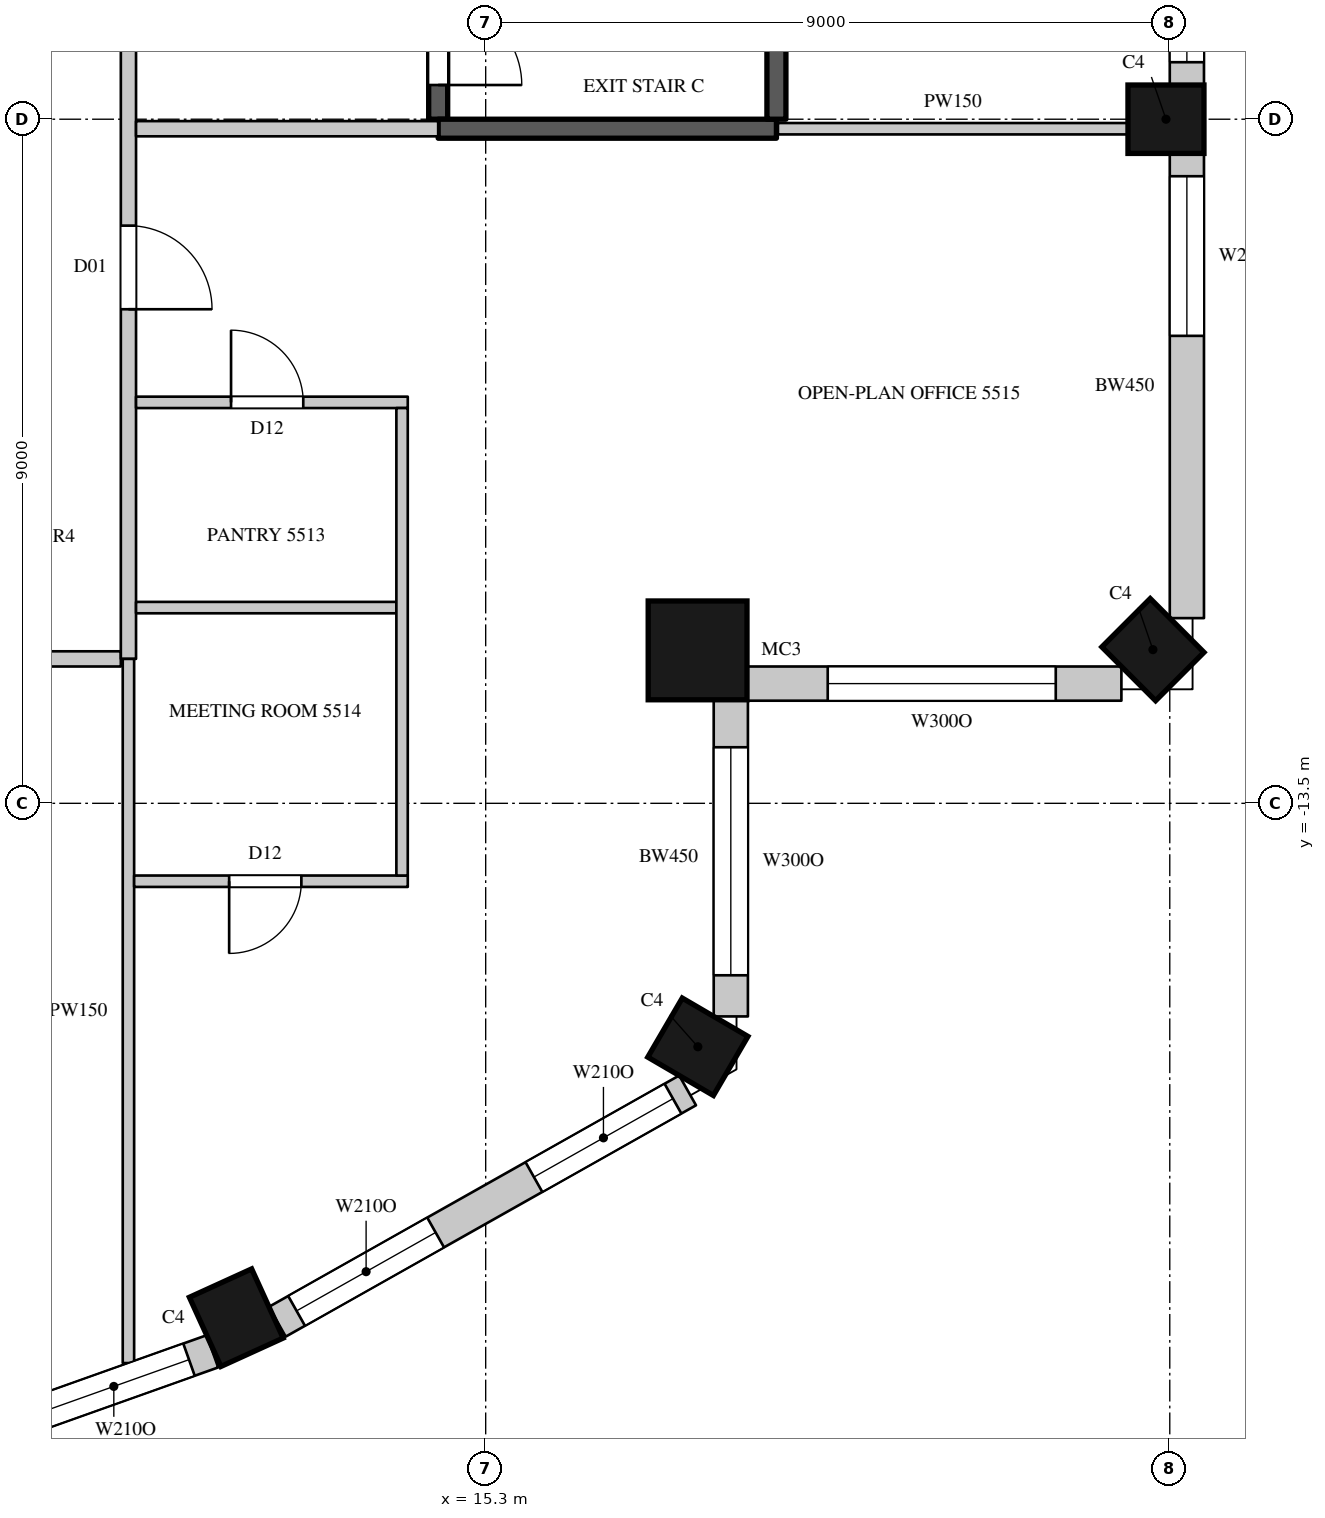
"""IFC4 building model, lengths in metres.
Left out: names, types, materials, properties, quantities, classifications, styles, units other than length and angle.
Written with IfcOpenShell. Run it as: python <this file> out.ifc"""

import sys

from ifc_helpers import new_model, si_unit, direction, frame, frame_2d, origin, origin_2d, place, context, subcontext, project, spatial, rectangle, circle, extrude, element, fill, save


model = new_model("IFC4")
c1 = context("Model", 3, precision=1e-05, world=origin(), true_north=direction((0.0, 1.0)))
c2 = subcontext(c1, "Body", "Model", "MODEL_VIEW")
j1 = project(units=[si_unit("LENGTHUNIT", "METRE"), si_unit("PLANEANGLEUNIT", "RADIAN")], contexts=[c1])
p1 = place(None, origin())
s1 = spatial("IfcSite", under=j1, at=p1, CompositionType="ELEMENT")
p2 = place(p1, origin())
s2 = spatial("IfcBuilding", under=s1, at=p2, CompositionType="ELEMENT")
p3 = place(p2, frame((0.0, 0.0, 247.5)))
s3 = spatial("IfcBuildingStorey", under=s2, at=p3, CompositionType="ELEMENT", Elevation=247.5)
for number, where, z_axis, x_axis in (
    (1, (12.019, -20.267, 0.0), (0.0, 0.0, 1.0), (0.91, 0.415, 0.0)),
    (2, (18.091, -16.703, 0.0), (0.0, 0.0, 1.0), (0.504, 0.863, 0.0)),
):
    element("IfcColumn", number, at=place(p3, frame(where, z_axis=z_axis, x_axis=x_axis)), inside=s3, PredefinedType="COLUMN", context=c2, shape_type="SweptSolid", body=[
        extrude(rectangle(XDim=0.9, YDim=1.0, at=origin_2d()), origin(), (0.0, 0.0, 1.0), 4.1),
    ])
p4 = place(p3, frame((18.088, -11.488, 0.0), z_axis=(0.0, 0.0, 1.0), x_axis=(1.0, 0.0, 0.0)))
e3 = element("IfcColumn", 3, at=p4, inside=s3, PredefinedType="COLUMN", context=c2, shape_type="SweptSolid", body=[
    extrude(circle(Radius=0.65, at=origin_2d()), origin(), (0.0, 0.0, 1.0), 4.1),
])
for number, where, z_axis, x_axis in (
    (4, (24.078, -11.478, 0.0), (0.0, 0.0, 1.0), (0.707, 0.707, 0.0)),
    (5, (24.25, -4.5, 0.0), (0.0, 0.0, 1.0), (0.0, 1.0, 0.0)),
):
    element("IfcColumn", number, at=place(p3, frame(where, z_axis=z_axis, x_axis=x_axis)), inside=s3, PredefinedType="COLUMN", context=c2, shape_type="SweptSolid", body=[
        extrude(rectangle(XDim=0.9, YDim=1.0, at=origin_2d()), origin(), (0.0, 0.0, 1.0), 4.1),
    ])
p5 = place(p3, frame((5.665, -22.859, 0.0), z_axis=(0.0, 0.0, 1.0), x_axis=(0.942108340262, 0.335308626803, 0.0)))
e6 = element("IfcWall", 6, at=p5, inside=s3, PredefinedType="SOLIDWALL", context=c2, shape_type="SweptSolid", body=[
    extrude(rectangle(XDim=6.412, YDim=0.45, at=frame_2d((3.206, 0.0))), origin(), (0.0, 0.0, 1.0), 3.8),
])
p6 = place(p5, frame((0.327, 0.0, 1.05)))
e7 = element("IfcOpeningElement", 7, at=p6, cuts=e6, PredefinedType="OPENING", context=c2, shape_type="SweptSolid", body=[
    extrude(rectangle(XDim=2.1, YDim=2.4, at=frame_2d((1.05, 1.2))), frame((0.0, 0.235, 0.0), z_axis=(0.0, -1.0, 0.0), x_axis=(1.0, 0.0, 0.0)), (0.0, 0.0, 1.0), 0.47),
])
p7 = place(p5, frame((3.985, 0.0, 1.05)))
e8 = element("IfcOpeningElement", 8, at=p7, cuts=e6, PredefinedType="OPENING", context=c2, shape_type="SweptSolid", body=[
    extrude(rectangle(XDim=2.1, YDim=2.4, at=frame_2d((1.05, 1.2))), frame((0.0, 0.235, 0.0), z_axis=(0.0, -1.0, 0.0), x_axis=(1.0, 0.0, 0.0)), (0.0, 0.0, 1.0), 0.47),
])
p8 = place(p3, frame((12.559, -20.32, 0.0), z_axis=(0.0, 0.0, 1.0), x_axis=(0.871065783524, 0.491166367714, 0.0)))
e9 = element("IfcWall", 9, at=p8, inside=s3, PredefinedType="SOLIDWALL", context=c2, shape_type="SweptSolid", body=[
    extrude(rectangle(XDim=6.196, YDim=0.45, at=frame_2d((3.098, 0.0))), origin(), (0.0, 0.0, 1.0), 3.8),
])
p9 = place(p8, frame((0.291, 0.0, 1.05)))
e10 = element("IfcOpeningElement", 10, at=p9, cuts=e9, PredefinedType="OPENING", context=c2, shape_type="SweptSolid", body=[
    extrude(rectangle(XDim=2.1, YDim=2.4, at=frame_2d((1.05, 1.2))), frame((0.0, 0.235, 0.0), z_axis=(0.0, -1.0, 0.0), x_axis=(1.0, 0.0, 0.0)), (0.0, 0.0, 1.0), 0.47),
])
p10 = place(p8, frame((3.875, 0.0, 1.05)))
e11 = element("IfcOpeningElement", 11, at=p10, cuts=e9, PredefinedType="OPENING", context=c2, shape_type="SweptSolid", body=[
    extrude(rectangle(XDim=2.1, YDim=2.4, at=frame_2d((1.05, 1.2))), frame((0.0, 0.235, 0.0), z_axis=(0.0, -1.0, 0.0), x_axis=(1.0, 0.0, 0.0)), (0.0, 0.0, 1.0), 0.47),
])
p11 = place(p3, frame((18.525, -16.304, 0.0), z_axis=(0.0, 0.0, 1.0), x_axis=(0.0, 1.0, 0.0)))
e12 = element("IfcWall", 12, at=p11, inside=s3, PredefinedType="SOLIDWALL", context=c2, shape_type="SweptSolid", body=[
    extrude(rectangle(XDim=4.202, YDim=0.45, at=frame_2d((2.101, 0.0))), origin(), (0.0, 0.0, 1.0), 3.8),
])
p12 = place(p11, frame((0.541, 0.0, 1.05)))
e13 = element("IfcOpeningElement", 13, at=p12, cuts=e12, PredefinedType="OPENING", context=c2, shape_type="SweptSolid", body=[
    extrude(rectangle(XDim=3.0, YDim=2.4, at=frame_2d((1.5, 1.2))), frame((0.0, 0.235, 0.0), z_axis=(0.0, -1.0, 0.0), x_axis=(1.0, 0.0, 0.0)), (0.0, 0.0, 1.0), 0.47),
])
p13 = place(p3, frame((18.701, -11.925, 0.0), z_axis=(0.0, 0.0, 1.0), x_axis=(1.0, 0.0, 0.0)))
e14 = element("IfcWall", 14, at=p13, inside=s3, PredefinedType="SOLIDWALL", context=c2, shape_type="SweptSolid", body=[
    extrude(rectangle(XDim=4.962, YDim=0.45, at=frame_2d((2.481, 0.0))), origin(), (0.0, 0.0, 1.0), 3.8),
])
p14 = place(p13, frame((1.098, 0.0, 1.05)))
e15 = element("IfcOpeningElement", 15, at=p14, cuts=e14, PredefinedType="OPENING", context=c2, shape_type="SweptSolid", body=[
    extrude(rectangle(XDim=3.0, YDim=2.4, at=frame_2d((1.5, 1.2))), frame((0.0, 0.235, 0.0), z_axis=(0.0, -1.0, 0.0), x_axis=(1.0, 0.0, 0.0)), (0.0, 0.0, 1.0), 0.47),
])
p15 = place(p3, frame((24.525, -11.064, 0.0), z_axis=(0.0, 0.0, 1.0), x_axis=(0.0, 1.0, 0.0)))
e16 = element("IfcWall", 16, at=p15, inside=s3, PredefinedType="SOLIDWALL", context=c2, shape_type="SweptSolid", body=[
    extrude(rectangle(XDim=6.114, YDim=0.45, at=frame_2d((3.057, 0.0))), origin(), (0.0, 0.0, 1.0), 3.8),
])
p16 = place(p15, frame((3.714, 0.0, 1.05)))
e17 = element("IfcOpeningElement", 17, at=p16, cuts=e16, PredefinedType="OPENING", context=c2, shape_type="SweptSolid", body=[
    extrude(rectangle(XDim=2.1, YDim=2.4, at=frame_2d((1.05, 1.2))), frame((0.0, 0.235, 0.0), z_axis=(0.0, -1.0, 0.0), x_axis=(1.0, 0.0, 0.0)), (0.0, 0.0, 1.0), 0.47),
])
p17 = place(p3, frame((24.525, -4.05, 0.0), z_axis=(0.0, 0.0, 1.0), x_axis=(0.0, 1.0, 0.0)))
e18 = element("IfcWall", 18, at=p17, inside=s3, PredefinedType="SOLIDWALL", context=c2, shape_type="SweptSolid", body=[
    extrude(rectangle(XDim=8.1, YDim=0.45, at=frame_2d((4.05, 0.0))), origin(), (0.0, 0.0, 1.0), 3.8),
])
p18 = place(p17, frame((0.3, 0.0, 1.05)))
e19 = element("IfcOpeningElement", 19, at=p18, cuts=e18, PredefinedType="OPENING", context=c2, shape_type="SweptSolid", body=[
    extrude(rectangle(XDim=3.0, YDim=2.4, at=frame_2d((1.5, 1.2))), frame((0.0, 0.235, 0.0), z_axis=(0.0, -1.0, 0.0), x_axis=(1.0, 0.0, 0.0)), (0.0, 0.0, 1.0), 0.47),
])
p19 = place(p17, frame((4.8, 0.0, 1.05)))
e20 = element("IfcOpeningElement", 20, at=p19, cuts=e18, PredefinedType="OPENING", context=c2, shape_type="SweptSolid", body=[
    extrude(rectangle(XDim=3.0, YDim=2.4, at=frame_2d((1.5, 1.2))), frame((0.0, 0.235, 0.0), z_axis=(0.0, -1.0, 0.0), x_axis=(1.0, 0.0, 0.0)), (0.0, 0.0, 1.0), 0.47),
])
p20 = place(p3, frame((-10.9, -11.6, 0.0), z_axis=(0.0, 0.0, 1.0), x_axis=(1.0, 0.0, 0.0)))
e21 = element("IfcWall", 21, at=p20, inside=s3, PredefinedType="PARTITIONING", context=c2, shape_type="SweptSolid", body=[
    extrude(rectangle(XDim=21.4, YDim=0.2, at=frame_2d((10.7, 0.0))), origin(), (0.0, 0.0, 1.0), 3.8),
])
p21 = place(p20, frame((0.95, 0.0, 0.0)))
e22 = element("IfcOpeningElement", 22, at=p21, cuts=e21, PredefinedType="OPENING", context=c2, shape_type="SweptSolid", body=[
    extrude(rectangle(XDim=0.9, YDim=2.2, at=frame_2d((0.45, 1.1))), frame((0.0, 0.11, 0.0), z_axis=(0.0, -1.0, 0.0), x_axis=(1.0, 0.0, 0.0)), (0.0, 0.0, 1.0), 0.22),
])
p22 = place(p20, frame((4.2, 0.0, 0.0)))
e23 = element("IfcOpeningElement", 23, at=p22, cuts=e21, PredefinedType="OPENING", context=c2, shape_type="SweptSolid", body=[
    extrude(rectangle(XDim=0.9, YDim=2.2, at=frame_2d((0.45, 1.1))), frame((0.0, 0.11, 0.0), z_axis=(0.0, -1.0, 0.0), x_axis=(1.0, 0.0, 0.0)), (0.0, 0.0, 1.0), 0.22),
])
p23 = place(p20, frame((6.85, 0.0, 0.0)))
e24 = element("IfcOpeningElement", 24, at=p23, cuts=e21, PredefinedType="OPENING", context=c2, shape_type="SweptSolid", body=[
    extrude(rectangle(XDim=1.1, YDim=2.4, at=frame_2d((0.55, 1.2))), frame((0.0, 0.11, 0.0), z_axis=(0.0, -1.0, 0.0), x_axis=(1.0, 0.0, 0.0)), (0.0, 0.0, 1.0), 0.22),
])
p24 = place(p20, frame((9.8, 0.0, 0.0)))
e25 = element("IfcOpeningElement", 25, at=p24, cuts=e21, PredefinedType="OPENING", context=c2, shape_type="SweptSolid", body=[
    extrude(rectangle(XDim=1.1, YDim=2.4, at=frame_2d((0.55, 1.2))), frame((0.0, 0.11, 0.0), z_axis=(0.0, -1.0, 0.0), x_axis=(1.0, 0.0, 0.0)), (0.0, 0.0, 1.0), 0.22),
])
p25 = place(p3, frame((10.6, -11.6, 0.0), z_axis=(0.0, 0.0, 1.0), x_axis=(0.0, 1.0, 0.0)))
e26 = element("IfcWall", 26, at=p25, inside=s3, PredefinedType="PARTITIONING", context=c2, shape_type="SweptSolid", body=[
    extrude(rectangle(XDim=23.7, YDim=0.2, at=frame_2d((11.85, 0.0))), origin(), (0.0, 0.0, 1.0), 3.8),
])
p26 = place(p25, frame((9.45, 0.0, 0.0)))
e27 = element("IfcOpeningElement", 27, at=p26, cuts=e26, PredefinedType="OPENING", context=c2, shape_type="SweptSolid", body=[
    extrude(rectangle(XDim=1.5, YDim=2.4, at=frame_2d((0.75, 1.2))), frame((0.0, 0.11, 0.0), z_axis=(0.0, -1.0, 0.0), x_axis=(1.0, 0.0, 0.0)), (0.0, 0.0, 1.0), 0.22),
])
p27 = place(p25, frame((19.45, 0.0, 0.0)))
e28 = element("IfcOpeningElement", 28, at=p27, cuts=e26, PredefinedType="OPENING", context=c2, shape_type="SweptSolid", body=[
    extrude(rectangle(XDim=1.1, YDim=2.4, at=frame_2d((0.55, 1.2))), frame((0.0, 0.11, 0.0), z_axis=(0.0, -1.0, 0.0), x_axis=(1.0, 0.0, 0.0)), (0.0, 0.0, 1.0), 0.22),
])
p28 = place(p25, frame((4.6, 0.0, 0.0)))
e29 = element("IfcOpeningElement", 29, at=p28, cuts=e26, PredefinedType="OPENING", context=c2, shape_type="SweptSolid", body=[
    extrude(rectangle(XDim=1.1, YDim=2.4, at=frame_2d((0.55, 1.2))), frame((0.0, 0.11, 0.0), z_axis=(0.0, -1.0, 0.0), x_axis=(1.0, 0.0, 0.0)), (0.0, 0.0, 1.0), 0.22),
])
p29 = place(p3, frame((10.7, -4.625, 0.0), z_axis=(0.0, 0.0, 1.0), x_axis=(1.0, 0.0, 0.0)))
e30 = element("IfcWall", 30, at=p29, inside=s3, PredefinedType="PARTITIONING", context=c2, shape_type="SweptSolid", body=[
    extrude(rectangle(XDim=3.975, YDim=0.2, at=frame_2d((1.988, 0.0))), origin(), (0.0, 0.0, 1.0), 3.8),
])
p30 = place(p3, frame((10.6, -20.864, 0.0), z_axis=(0.0, 0.0, 1.0), x_axis=(0.0, 1.0, 0.0)))
e31 = element("IfcWall", 31, at=p30, inside=s3, PredefinedType="PARTITIONING", context=c2, shape_type="SweptSolid", body=[
    extrude(rectangle(XDim=9.264, YDim=0.15, at=frame_2d((4.632, 0.0))), origin(), (0.0, 0.0, 1.0), 3.8),
])
p31 = place(p3, frame((10.675, -14.525, 0.0), z_axis=(0.0, 0.0, 1.0), x_axis=(1.0, 0.0, 0.0)))
e32 = element("IfcWall", 32, at=p31, inside=s3, PredefinedType="PARTITIONING", context=c2, shape_type="SweptSolid", body=[
    extrude(rectangle(XDim=3.6, YDim=0.15, at=frame_2d((1.8, 0.0))), origin(), (0.0, 0.0, 1.0), 3.8),
])
p32 = place(p31, frame((1.25, 0.0, 0.0)))
e33 = element("IfcOpeningElement", 33, at=p32, cuts=e32, PredefinedType="OPENING", context=c2, shape_type="SweptSolid", body=[
    extrude(rectangle(XDim=0.95, YDim=2.2, at=frame_2d((0.475, 1.1))), frame((0.0, 0.085, 0.0), z_axis=(0.0, -1.0, 0.0), x_axis=(1.0, 0.0, 0.0)), (0.0, 0.0, 1.0), 0.17),
])
p33 = place(p3, frame((10.7, -10.925, 0.0), z_axis=(0.0, 0.0, 1.0), x_axis=(1.0, 0.0, 0.0)))
e34 = element("IfcWall", 34, at=p33, inside=s3, PredefinedType="PARTITIONING", context=c2, shape_type="SweptSolid", body=[
    extrude(rectangle(XDim=3.425, YDim=0.15, at=frame_2d((1.712, 0.0))), origin(), (0.0, 0.0, 1.0), 3.8),
])
p34 = place(p3, frame((10.7, -8.225, 0.0), z_axis=(0.0, 0.0, 1.0), x_axis=(1.0, 0.0, 0.0)))
e35 = element("IfcWall", 35, at=p34, inside=s3, PredefinedType="PARTITIONING", context=c2, shape_type="SweptSolid", body=[
    extrude(rectangle(XDim=3.575, YDim=0.15, at=frame_2d((1.788, 0.0))), origin(), (0.0, 0.0, 1.0), 3.15),
])
p35 = place(p34, frame((1.25, 0.0, 0.0)))
e36 = element("IfcOpeningElement", 36, at=p35, cuts=e35, PredefinedType="OPENING", context=c2, shape_type="SweptSolid", body=[
    extrude(rectangle(XDim=0.95, YDim=2.2, at=frame_2d((0.475, 1.1))), frame((0.0, 0.085, 0.0), z_axis=(0.0, -1.0, 0.0), x_axis=(1.0, 0.0, 0.0)), (0.0, 0.0, 1.0), 0.17),
])
p36 = place(p3, frame((14.2, -14.45, 0.0), z_axis=(0.0, 0.0, 1.0), x_axis=(0.0, 1.0, 0.0)))
e37 = element("IfcWall", 37, at=p36, inside=s3, PredefinedType="PARTITIONING", context=c2, shape_type="SweptSolid", body=[
    extrude(rectangle(XDim=6.15, YDim=0.15, at=frame_2d((3.075, 0.0))), origin(), (0.0, 0.0, 1.0), 3.8),
])
p37 = place(p3, frame((19.145, -4.625, 0.0), z_axis=(0.0, 0.0, 1.0), x_axis=(1.0, 0.0, 0.0)))
e38 = element("IfcWall", 38, at=p37, inside=s3, PredefinedType="PARTITIONING", context=c2, shape_type="SweptSolid", body=[
    extrude(rectangle(XDim=4.605, YDim=0.15, at=frame_2d((2.302, 0.0))), origin(), (0.0, 0.0, 1.0), 3.8),
])
p38 = place(p3, frame((14.675, -4.5, 0.0), z_axis=(0.0, 0.0, 1.0), x_axis=(0.0, 1.0, 0.0)))
e39 = element("IfcWall", 39, at=p38, inside=s3, PredefinedType="SHEAR", context=c2, shape_type="SweptSolid", body=[
    extrude(rectangle(XDim=9.0, YDim=0.25, at=frame_2d((4.5, 0.0))), origin(), (0.0, 0.0, 1.0), 3.8),
])
p39 = place(p38, frame((0.45, 0.0, 0.0)))
e40 = element("IfcOpeningElement", 40, at=p39, cuts=e39, PredefinedType="OPENING", context=c2, shape_type="SweptSolid", body=[
    extrude(rectangle(XDim=1.1, YDim=2.2, at=frame_2d((0.55, 1.1))), frame((0.0, 0.135, 0.0), z_axis=(0.0, -1.0, 0.0), x_axis=(1.0, 0.0, 0.0)), (0.0, 0.0, 1.0), 0.27),
])
p40 = place(p3, frame((14.675, -4.625, 0.0), z_axis=(0.0, 0.0, 1.0), x_axis=(1.0, 0.0, 0.0)))
e41 = element("IfcWall", 41, at=p40, inside=s3, PredefinedType="SHEAR", context=c2, shape_type="SweptSolid", body=[
    extrude(rectangle(XDim=4.45, YDim=0.25, at=frame_2d((2.225, 0.0))), origin(), (0.0, 0.0, 1.0), 3.8),
])
p41 = place(p3, frame((19.125, -4.5, 0.0), z_axis=(0.0, 0.0, 1.0), x_axis=(0.0, 1.0, 0.0)))
e42 = element("IfcWall", 42, at=p41, inside=s3, PredefinedType="SHEAR", context=c2, shape_type="SweptSolid", body=[
    extrude(rectangle(XDim=9.0, YDim=0.25, at=frame_2d((4.5, 0.0))), origin(), (0.0, 0.0, 1.0), 3.8),
])
p42 = place(p7, origin())
e43 = element("IfcWindow", 43, at=p42, inside=s3, PartitioningType="SINGLE_PANEL", PredefinedType="WINDOW", context=c2, shape_type="SweptSolid", body=[
    extrude(rectangle(XDim=2.1, YDim=2.4, at=frame_2d((1.05, 1.2))), frame((0.0, 0.135, 0.0), z_axis=(0.0, -1.0, 0.0), x_axis=(1.0, 0.0, 0.0)), (0.0, 0.0, 1.0), 0.06),
])
fill(e8, e43)
p43 = place(p9, origin())
e44 = element("IfcWindow", 44, at=p43, inside=s3, PartitioningType="SINGLE_PANEL", PredefinedType="WINDOW", context=c2, shape_type="SweptSolid", body=[
    extrude(rectangle(XDim=2.1, YDim=2.4, at=frame_2d((1.05, 1.2))), frame((0.0, 0.135, 0.0), z_axis=(0.0, -1.0, 0.0), x_axis=(1.0, 0.0, 0.0)), (0.0, 0.0, 1.0), 0.06),
])
fill(e10, e44)
p44 = place(p10, origin())
e45 = element("IfcWindow", 45, at=p44, inside=s3, PartitioningType="SINGLE_PANEL", PredefinedType="WINDOW", context=c2, shape_type="SweptSolid", body=[
    extrude(rectangle(XDim=2.1, YDim=2.4, at=frame_2d((1.05, 1.2))), frame((0.0, 0.135, 0.0), z_axis=(0.0, -1.0, 0.0), x_axis=(1.0, 0.0, 0.0)), (0.0, 0.0, 1.0), 0.06),
])
fill(e11, e45)
p45 = place(p12, origin())
e46 = element("IfcWindow", 46, at=p45, inside=s3, PartitioningType="SINGLE_PANEL", PredefinedType="WINDOW", context=c2, shape_type="SweptSolid", body=[
    extrude(rectangle(XDim=3.0, YDim=2.4, at=frame_2d((1.5, 1.2))), frame((0.0, 0.135, 0.0), z_axis=(0.0, -1.0, 0.0), x_axis=(1.0, 0.0, 0.0)), (0.0, 0.0, 1.0), 0.06),
])
fill(e13, e46)
p46 = place(p14, origin())
e47 = element("IfcWindow", 47, at=p46, inside=s3, PartitioningType="SINGLE_PANEL", PredefinedType="WINDOW", context=c2, shape_type="SweptSolid", body=[
    extrude(rectangle(XDim=3.0, YDim=2.4, at=frame_2d((1.5, 1.2))), frame((0.0, 0.135, 0.0), z_axis=(0.0, -1.0, 0.0), x_axis=(1.0, 0.0, 0.0)), (0.0, 0.0, 1.0), 0.06),
])
fill(e15, e47)
p47 = place(p16, origin())
e48 = element("IfcWindow", 48, at=p47, inside=s3, PartitioningType="SINGLE_PANEL", PredefinedType="WINDOW", context=c2, shape_type="SweptSolid", body=[
    extrude(rectangle(XDim=2.1, YDim=2.4, at=frame_2d((1.05, 1.2))), frame((0.0, 0.135, 0.0), z_axis=(0.0, -1.0, 0.0), x_axis=(1.0, 0.0, 0.0)), (0.0, 0.0, 1.0), 0.06),
])
fill(e17, e48)
p48 = place(p18, origin())
e49 = element("IfcWindow", 49, at=p48, inside=s3, PartitioningType="SINGLE_PANEL", PredefinedType="WINDOW", context=c2, shape_type="SweptSolid", body=[
    extrude(rectangle(XDim=3.0, YDim=2.4, at=frame_2d((1.5, 1.2))), frame((0.0, 0.135, 0.0), z_axis=(0.0, -1.0, 0.0), x_axis=(1.0, 0.0, 0.0)), (0.0, 0.0, 1.0), 0.06),
])
fill(e19, e49)
p49 = place(p28, origin())
e50 = element("IfcDoor", 50, at=p49, inside=s3, OperationType="SINGLE_SWING_RIGHT", PredefinedType="DOOR", context=c2, shape_type="SweptSolid", body=[
    extrude(rectangle(XDim=1.1, YDim=2.4, at=frame_2d((0.55, 1.2))), frame((0.0, 0.025, 0.0), z_axis=(0.0, -1.0, 0.0), x_axis=(1.0, 0.0, 0.0)), (0.0, 0.0, 1.0), 0.05),
])
fill(e29, e50)
p50 = place(p35, origin())
e51 = element("IfcDoor", 51, at=p50, inside=s3, OperationType="SINGLE_SWING_LEFT", PredefinedType="DOOR", context=c2, shape_type="SweptSolid", body=[
    extrude(rectangle(XDim=0.95, YDim=2.2, at=frame_2d((0.475, 1.1))), frame((0.0, 0.025, 0.0), z_axis=(0.0, -1.0, 0.0), x_axis=(1.0, 0.0, 0.0)), (0.0, 0.0, 1.0), 0.05),
])
fill(e36, e51)
p51 = place(p32, origin())
e52 = element("IfcDoor", 52, at=p51, inside=s3, OperationType="SINGLE_SWING_RIGHT", PredefinedType="DOOR", context=c2, shape_type="SweptSolid", body=[
    extrude(rectangle(XDim=0.95, YDim=2.2, at=frame_2d((0.475, 1.1))), frame((0.0, 0.025, 0.0), z_axis=(0.0, -1.0, 0.0), x_axis=(1.0, 0.0, 0.0)), (0.0, 0.0, 1.0), 0.05),
])
fill(e33, e52)
p52 = place(p39, origin())
e53 = element("IfcDoor", 53, at=p52, inside=s3, OperationType="SINGLE_SWING_RIGHT", PredefinedType="DOOR", context=c2, shape_type="SweptSolid", body=[
    extrude(rectangle(XDim=1.1, YDim=2.2, at=frame_2d((0.55, 1.1))), frame((0.0, 0.025, 0.0), z_axis=(0.0, -1.0, 0.0), x_axis=(1.0, 0.0, 0.0)), (0.0, 0.0, 1.0), 0.05),
])
fill(e40, e53)
save(model, sys.argv[1])
